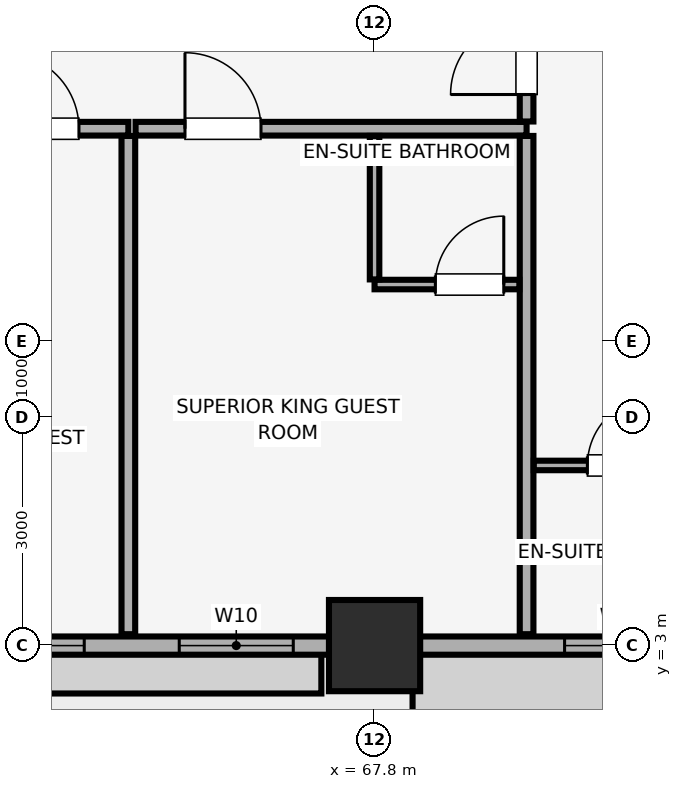
"""IFC4 building model, lengths in metres.
Left out: names, types, materials, properties, quantities, classifications, styles, units other than length and angle.
Written with IfcOpenShell. Run it as: python <this file> out.ifc"""

import sys

from ifc_helpers import new_model, si_unit, direction, frame, frame_2d, origin, origin_2d, place, context, subcontext, project, spatial, rectangle, extrude, element, fill, save


model = new_model("IFC4")
c1 = context("Model", 3, precision=1e-05, world=origin(), true_north=direction((0.0, 1.0)))
c2 = subcontext(c1, "Body", "Model", "MODEL_VIEW")
j1 = project(units=[si_unit("LENGTHUNIT", "METRE"), si_unit("PLANEANGLEUNIT", "RADIAN")], contexts=[c1])
p1 = place(None, origin())
s1 = spatial("IfcSite", under=j1, at=p1, CompositionType="ELEMENT")
p2 = place(p1, origin())
s2 = spatial("IfcBuilding", under=s1, at=p2, CompositionType="ELEMENT")
p3 = place(p2, frame((0.0, 0.0, 135.35)))
s3 = spatial("IfcBuildingStorey", under=s2, at=p3, CompositionType="ELEMENT", Elevation=135.35)
p4 = place(p3, frame((67.8, 3.0, 0.0), z_axis=(0.0, 0.0, 1.0), x_axis=(1.0, 0.0, 0.0)))
e1 = element("IfcColumn", 1, at=p4, inside=s3, PredefinedType="COLUMN", context=c2, shape_type="SweptSolid", body=[
    extrude(rectangle(XDim=1.2, YDim=1.2, at=origin_2d()), origin(), (0.0, 0.0, 1.0), 3.56),
])
p5 = place(p3, frame((7.0, 3.0, 0.0), z_axis=(0.0, 0.0, 1.0), x_axis=(1.0, 0.0, 0.0)))
e2 = element("IfcWall", 2, at=p5, inside=s3, PredefinedType="SOLIDWALL", context=c2, shape_type="SweptSolid", body=[
    extrude(rectangle(XDim=70.0, YDim=0.24, at=frame_2d((35.0, 0.0))), origin(), (0.0, 0.0, 1.0), 2.61),
])
p6 = place(p5, frame((19.517, 0.0, 0.0)))
e3 = element("IfcOpeningElement", 3, at=p6, cuts=e2, PredefinedType="OPENING", context=c2, shape_type="SweptSolid", body=[
    extrude(rectangle(XDim=1.1, YDim=2.15, at=frame_2d((0.55, 1.075))), frame((0.0, 0.13, 0.0), z_axis=(0.0, -1.0, 0.0), x_axis=(1.0, 0.0, 0.0)), (0.0, 0.0, 1.0), 0.26),
])
p7 = place(p5, frame((34.45, 0.0, 0.0)))
e4 = element("IfcOpeningElement", 4, at=p7, cuts=e2, PredefinedType="OPENING", context=c2, shape_type="SweptSolid", body=[
    extrude(rectangle(XDim=1.1, YDim=2.15, at=frame_2d((0.55, 1.075))), frame((0.0, 0.13, 0.0), z_axis=(0.0, -1.0, 0.0), x_axis=(1.0, 0.0, 0.0)), (0.0, 0.0, 1.0), 0.26),
])
p8 = place(p5, frame((49.421, 0.0, 0.0)))
e5 = element("IfcOpeningElement", 5, at=p8, cuts=e2, PredefinedType="OPENING", context=c2, shape_type="SweptSolid", body=[
    extrude(rectangle(XDim=1.1, YDim=2.15, at=frame_2d((0.55, 1.075))), frame((0.0, 0.13, 0.0), z_axis=(0.0, -1.0, 0.0), x_axis=(1.0, 0.0, 0.0)), (0.0, 0.0, 1.0), 0.26),
])
p9 = place(p5, frame((5.2, 0.0, 0.85)))
e6 = element("IfcOpeningElement", 6, at=p9, cuts=e2, PredefinedType="OPENING", context=c2, shape_type="SweptSolid", body=[
    extrude(rectangle(XDim=1.5, YDim=1.4, at=frame_2d((0.75, 0.7))), frame((0.0, 0.13, 0.0), z_axis=(0.0, -1.0, 0.0), x_axis=(1.0, 0.0, 0.0)), (0.0, 0.0, 1.0), 0.26),
])
p10 = place(p5, frame((10.163, 0.0, 0.85)))
e7 = element("IfcOpeningElement", 7, at=p10, cuts=e2, PredefinedType="OPENING", context=c2, shape_type="SweptSolid", body=[
    extrude(rectangle(XDim=1.5, YDim=1.4, at=frame_2d((0.75, 0.7))), frame((0.0, 0.13, 0.0), z_axis=(0.0, -1.0, 0.0), x_axis=(1.0, 0.0, 0.0)), (0.0, 0.0, 1.0), 0.26),
])
p11 = place(p5, frame((12.913, 0.0, 0.85)))
e8 = element("IfcOpeningElement", 8, at=p11, cuts=e2, PredefinedType="OPENING", context=c2, shape_type="SweptSolid", body=[
    extrude(rectangle(XDim=2.4, YDim=1.5, at=frame_2d((1.2, 0.75))), frame((0.0, 0.13, 0.0), z_axis=(0.0, -1.0, 0.0), x_axis=(1.0, 0.0, 0.0)), (0.0, 0.0, 1.0), 0.26),
])
p12 = place(p5, frame((24.45, 0.0, 0.85)))
e9 = element("IfcOpeningElement", 9, at=p12, cuts=e2, PredefinedType="OPENING", context=c2, shape_type="SweptSolid", body=[
    extrude(rectangle(XDim=2.4, YDim=1.5, at=frame_2d((1.2, 0.75))), frame((0.0, 0.13, 0.0), z_axis=(0.0, -1.0, 0.0), x_axis=(1.0, 0.0, 0.0)), (0.0, 0.0, 1.0), 0.26),
])
p13 = place(p5, frame((28.101, 0.0, 0.85)))
e10 = element("IfcOpeningElement", 10, at=p13, cuts=e2, PredefinedType="OPENING", context=c2, shape_type="SweptSolid", body=[
    extrude(rectangle(XDim=1.5, YDim=1.4, at=frame_2d((0.75, 0.7))), frame((0.0, 0.13, 0.0), z_axis=(0.0, -1.0, 0.0), x_axis=(1.0, 0.0, 0.0)), (0.0, 0.0, 1.0), 0.26),
])
p14 = place(p5, frame((40.239, 0.0, 0.85)))
e11 = element("IfcOpeningElement", 11, at=p14, cuts=e2, PredefinedType="OPENING", context=c2, shape_type="SweptSolid", body=[
    extrude(rectangle(XDim=1.5, YDim=1.4, at=frame_2d((0.75, 0.7))), frame((0.0, 0.13, 0.0), z_axis=(0.0, -1.0, 0.0), x_axis=(1.0, 0.0, 0.0)), (0.0, 0.0, 1.0), 0.26),
])
p15 = place(p5, frame((42.989, 0.0, 0.85)))
e12 = element("IfcOpeningElement", 12, at=p15, cuts=e2, PredefinedType="OPENING", context=c2, shape_type="SweptSolid", body=[
    extrude(rectangle(XDim=2.4, YDim=1.5, at=frame_2d((1.2, 0.75))), frame((0.0, 0.13, 0.0), z_axis=(0.0, -1.0, 0.0), x_axis=(1.0, 0.0, 0.0)), (0.0, 0.0, 1.0), 0.26),
])
p16 = place(p5, frame((54.581, 0.0, 0.85)))
e13 = element("IfcOpeningElement", 13, at=p16, cuts=e2, PredefinedType="OPENING", context=c2, shape_type="SweptSolid", body=[
    extrude(rectangle(XDim=2.4, YDim=1.5, at=frame_2d((1.2, 0.75))), frame((0.0, 0.13, 0.0), z_axis=(0.0, -1.0, 0.0), x_axis=(1.0, 0.0, 0.0)), (0.0, 0.0, 1.0), 0.26),
])
p17 = place(p5, frame((58.23, 0.0, 0.85)))
e14 = element("IfcOpeningElement", 14, at=p17, cuts=e2, PredefinedType="OPENING", context=c2, shape_type="SweptSolid", body=[
    extrude(rectangle(XDim=1.5, YDim=1.4, at=frame_2d((0.75, 0.7))), frame((0.0, 0.13, 0.0), z_axis=(0.0, -1.0, 0.0), x_axis=(1.0, 0.0, 0.0)), (0.0, 0.0, 1.0), 0.26),
])
p18 = place(p5, frame((63.3, 0.0, 0.85)))
e15 = element("IfcOpeningElement", 15, at=p18, cuts=e2, PredefinedType="OPENING", context=c2, shape_type="SweptSolid", body=[
    extrude(rectangle(XDim=1.5, YDim=1.4, at=frame_2d((0.75, 0.7))), frame((0.0, 0.13, 0.0), z_axis=(0.0, -1.0, 0.0), x_axis=(1.0, 0.0, 0.0)), (0.0, 0.0, 1.0), 0.26),
])
p19 = place(p3, frame((59.523, 9.8, 0.0), z_axis=(0.0, 0.0, 1.0), x_axis=(1.0, 0.0, 0.0)))
e16 = element("IfcWall", 16, at=p19, inside=s3, PredefinedType="PARTITIONING", context=c2, shape_type="SweptSolid", body=[
    extrude(rectangle(XDim=5.037, YDim=0.18, at=frame_2d((2.519, 0.0))), origin(), (0.0, 0.0, 1.0), 3.56),
])
p20 = place(p19, frame((3.387, 0.0, 0.0)))
e17 = element("IfcOpeningElement", 17, at=p20, cuts=e16, PredefinedType="OPENING", context=c2, shape_type="SweptSolid", body=[
    extrude(rectangle(XDim=1.0, YDim=2.15, at=frame_2d((0.5, 1.075))), frame((0.0, 0.1, 0.0), z_axis=(0.0, -1.0, 0.0), x_axis=(1.0, 0.0, 0.0)), (0.0, 0.0, 1.0), 0.2),
])
p21 = place(p3, frame((64.561, 3.15, 0.0), z_axis=(0.0, 0.0, 1.0), x_axis=(0.0, 1.0, 0.0)))
e18 = element("IfcWall", 18, at=p21, inside=s3, PredefinedType="PARTITIONING", context=c2, shape_type="SweptSolid", body=[
    extrude(rectangle(XDim=6.555, YDim=0.18, at=frame_2d((3.278, 0.0))), origin(), (0.0, 0.0, 1.0), 3.56),
])
p22 = place(p3, frame((64.656, 9.8, 0.0), z_axis=(0.0, 0.0, 1.0), x_axis=(1.0, 0.0, 0.0)))
e19 = element("IfcWall", 19, at=p22, inside=s3, PredefinedType="PARTITIONING", context=c2, shape_type="SweptSolid", body=[
    extrude(rectangle(XDim=5.144, YDim=0.18, at=frame_2d((2.572, 0.0))), origin(), (0.0, 0.0, 1.0), 3.56),
])
p23 = place(p22, frame((0.65, 0.0, 0.0)))
e20 = element("IfcOpeningElement", 20, at=p23, cuts=e19, PredefinedType="OPENING", context=c2, shape_type="SweptSolid", body=[
    extrude(rectangle(XDim=1.0, YDim=2.15, at=frame_2d((0.5, 1.075))), frame((0.0, 0.1, 0.0), z_axis=(0.0, -1.0, 0.0), x_axis=(1.0, 0.0, 0.0)), (0.0, 0.0, 1.0), 0.2),
])
p24 = place(p3, frame((69.8, 3.15, 0.0), z_axis=(0.0, 0.0, 1.0), x_axis=(0.0, 1.0, 0.0)))
e21 = element("IfcWall", 21, at=p24, inside=s3, PredefinedType="PARTITIONING", context=c2, shape_type="SweptSolid", body=[
    extrude(rectangle(XDim=6.555, YDim=0.18, at=frame_2d((3.278, 0.0))), origin(), (0.0, 0.0, 1.0), 3.56),
])
p25 = place(p3, frame((67.8, 7.75, 0.0), z_axis=(0.0, 0.0, 1.0), x_axis=(1.0, 0.0, 0.0)))
e22 = element("IfcWall", 22, at=p25, inside=s3, PredefinedType="PARTITIONING", context=c2, shape_type="SweptSolid", body=[
    extrude(rectangle(XDim=1.905, YDim=0.125, at=frame_2d((0.953, 0.0))), origin(), (0.0, 0.0, 1.0), 3.56),
])
p26 = place(p25, frame((0.8, 0.0, 0.0)))
e23 = element("IfcOpeningElement", 23, at=p26, cuts=e22, PredefinedType="OPENING", context=c2, shape_type="SweptSolid", body=[
    extrude(rectangle(XDim=0.9, YDim=2.1, at=frame_2d((0.45, 1.05))), frame((0.0, 0.073, 0.0), z_axis=(0.0, -1.0, 0.0), x_axis=(1.0, 0.0, 0.0)), (0.0, 0.0, 1.0), 0.145),
])
p27 = place(p3, frame((67.8, 7.817, 0.0), z_axis=(0.0, 0.0, 1.0), x_axis=(0.0, 1.0, 0.0)))
e24 = element("IfcWall", 24, at=p27, inside=s3, PredefinedType="PARTITIONING", context=c2, shape_type="SweptSolid", body=[
    extrude(rectangle(XDim=1.888, YDim=0.125, at=frame_2d((0.944, 0.0))), origin(), (0.0, 0.0, 1.0), 3.01),
])
p28 = place(p3, frame((69.8, 9.895, 0.0), z_axis=(0.0, 0.0, 1.0), x_axis=(0.0, 1.0, 0.0)))
e25 = element("IfcWall", 25, at=p28, inside=s3, PredefinedType="PARTITIONING", context=c2, shape_type="SweptSolid", body=[
    extrude(rectangle(XDim=1.71, YDim=0.18, at=frame_2d((0.855, 0.0))), origin(), (0.0, 0.0, 1.0), 3.56),
])
p29 = place(p28, frame((0.355, 0.0, 0.0)))
e26 = element("IfcOpeningElement", 26, at=p29, cuts=e25, PredefinedType="OPENING", context=c2, shape_type="SweptSolid", body=[
    extrude(rectangle(XDim=1.0, YDim=2.15, at=frame_2d((0.5, 1.075))), frame((0.0, 0.1, 0.0), z_axis=(0.0, -1.0, 0.0), x_axis=(1.0, 0.0, 0.0)), (0.0, 0.0, 1.0), 0.2),
])
p30 = place(p3, frame((69.895, 5.37, 0.0), z_axis=(0.0, 0.0, 1.0), x_axis=(1.0, 0.0, 0.0)))
e27 = element("IfcWall", 27, at=p30, inside=s3, PredefinedType="PARTITIONING", context=c2, shape_type="SweptSolid", body=[
    extrude(rectangle(XDim=2.405, YDim=0.125, at=frame_2d((1.203, 0.0))), origin(), (0.0, 0.0, 1.0), 3.56),
])
p31 = place(p30, frame((0.705, 0.0, 0.0)))
e28 = element("IfcOpeningElement", 28, at=p31, cuts=e27, PredefinedType="OPENING", context=c2, shape_type="SweptSolid", body=[
    extrude(rectangle(XDim=0.9, YDim=2.1, at=frame_2d((0.45, 1.05))), frame((0.0, 0.073, 0.0), z_axis=(0.0, -1.0, 0.0), x_axis=(1.0, 0.0, 0.0)), (0.0, 0.0, 1.0), 0.145),
])
p32 = place(p16, origin())
e29 = element("IfcWindow", 29, at=p32, inside=s3, PartitioningType="SINGLE_PANEL", PredefinedType="WINDOW", context=c2, shape_type="SweptSolid", body=[
    extrude(rectangle(XDim=2.4, YDim=1.5, at=frame_2d((1.2, 0.75))), frame((0.0, 0.03, 0.0), z_axis=(0.0, -1.0, 0.0), x_axis=(1.0, 0.0, 0.0)), (0.0, 0.0, 1.0), 0.06),
])
fill(e13, e29)
p33 = place(p17, origin())
e30 = element("IfcWindow", 30, at=p33, inside=s3, PartitioningType="SINGLE_PANEL", PredefinedType="WINDOW", context=c2, shape_type="SweptSolid", body=[
    extrude(rectangle(XDim=1.5, YDim=1.4, at=frame_2d((0.75, 0.7))), frame((0.0, 0.03, 0.0), z_axis=(0.0, -1.0, 0.0), x_axis=(1.0, 0.0, 0.0)), (0.0, 0.0, 1.0), 0.06),
])
fill(e14, e30)
p34 = place(p18, origin())
e31 = element("IfcWindow", 31, at=p34, inside=s3, PartitioningType="SINGLE_PANEL", PredefinedType="WINDOW", context=c2, shape_type="SweptSolid", body=[
    extrude(rectangle(XDim=1.5, YDim=1.4, at=frame_2d((0.75, 0.7))), frame((0.0, 0.03, 0.0), z_axis=(0.0, -1.0, 0.0), x_axis=(1.0, 0.0, 0.0)), (0.0, 0.0, 1.0), 0.06),
])
fill(e15, e31)
p35 = place(p20, origin())
e32 = element("IfcDoor", 32, at=p35, inside=s3, OperationType="SINGLE_SWING_LEFT", PredefinedType="DOOR", context=c2, shape_type="SweptSolid", body=[
    extrude(rectangle(XDim=1.0, YDim=2.15, at=frame_2d((0.5, 1.075))), frame((0.0, 0.025, 0.0), z_axis=(0.0, -1.0, 0.0), x_axis=(1.0, 0.0, 0.0)), (0.0, 0.0, 1.0), 0.05),
])
fill(e17, e32)
p36 = place(p23, origin())
e33 = element("IfcDoor", 33, at=p36, inside=s3, OperationType="SINGLE_SWING_LEFT", PredefinedType="DOOR", context=c2, shape_type="SweptSolid", body=[
    extrude(rectangle(XDim=1.0, YDim=2.15, at=frame_2d((0.5, 1.075))), frame((0.0, 0.025, 0.0), z_axis=(0.0, -1.0, 0.0), x_axis=(1.0, 0.0, 0.0)), (0.0, 0.0, 1.0), 0.05),
])
fill(e20, e33)
p37 = place(p26, origin())
e34 = element("IfcDoor", 34, at=p37, inside=s3, OperationType="SINGLE_SWING_RIGHT", PredefinedType="DOOR", context=c2, shape_type="SweptSolid", body=[
    extrude(rectangle(XDim=0.9, YDim=2.1, at=frame_2d((0.45, 1.05))), frame((0.0, 0.025, 0.0), z_axis=(0.0, -1.0, 0.0), x_axis=(1.0, 0.0, 0.0)), (0.0, 0.0, 1.0), 0.05),
])
fill(e23, e34)
p38 = place(p29, origin())
e35 = element("IfcDoor", 35, at=p38, inside=s3, OperationType="SINGLE_SWING_LEFT", PredefinedType="DOOR", context=c2, shape_type="SweptSolid", body=[
    extrude(rectangle(XDim=1.0, YDim=2.15, at=frame_2d((0.5, 1.075))), frame((0.0, 0.025, 0.0), z_axis=(0.0, -1.0, 0.0), x_axis=(1.0, 0.0, 0.0)), (0.0, 0.0, 1.0), 0.05),
])
fill(e26, e35)
p39 = place(p31, origin())
e36 = element("IfcDoor", 36, at=p39, inside=s3, OperationType="SINGLE_SWING_RIGHT", PredefinedType="DOOR", context=c2, shape_type="SweptSolid", body=[
    extrude(rectangle(XDim=0.9, YDim=2.1, at=frame_2d((0.45, 1.05))), frame((0.0, 0.025, 0.0), z_axis=(0.0, -1.0, 0.0), x_axis=(1.0, 0.0, 0.0)), (0.0, 0.0, 1.0), 0.05),
])
fill(e28, e36)
save(model, sys.argv[1])
